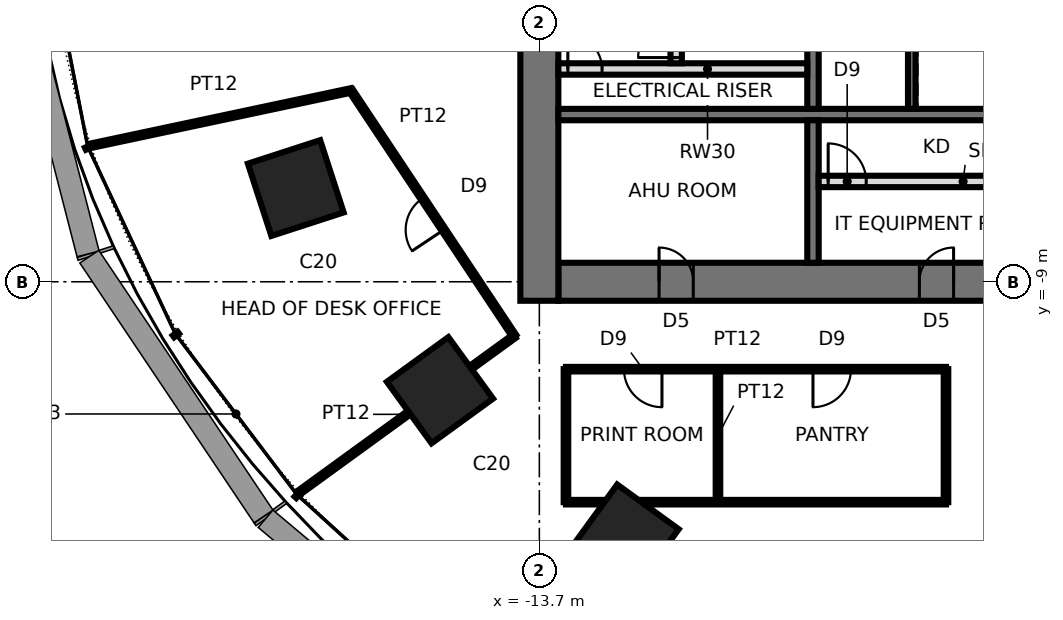
"""IFC4 building model, lengths in metres.
Left out: names, types, materials, properties, quantities, classifications, styles, units other than length and angle.
Written with IfcOpenShell. Run it as: python <this file> out.ifc"""

import sys

from ifc_helpers import new_model, si_unit, direction, frame, frame_2d, origin, origin_2d, place, context, subcontext, project, spatial, rectangle, extrude, element, fill, save


model = new_model("IFC4")
c1 = context("Model", 3, precision=1e-05, world=origin(), true_north=direction((0.0, 1.0)))
c2 = subcontext(c1, "Body", "Model", "MODEL_VIEW")
j1 = project(units=[si_unit("LENGTHUNIT", "METRE"), si_unit("PLANEANGLEUNIT", "RADIAN")], contexts=[c1])
p1 = place(None, origin())
s1 = spatial("IfcSite", under=j1, at=p1, CompositionType="ELEMENT")
p2 = place(p1, origin())
s2 = spatial("IfcBuilding", under=s1, at=p2, CompositionType="ELEMENT")
p3 = place(p2, frame((0.0, 0.0, 23.8)))
s3 = spatial("IfcBuildingStorey", under=s2, at=p3, CompositionType="ELEMENT", Elevation=23.8)
for number, where, z_axis, x_axis in (
    (1, (-20.109, -6.534, 0.0), (0.0, 0.0, 1.0), (-0.951, -0.309, 0.0)),
    (2, (-16.315, -11.854, 0.0), (0.0, 0.0, 1.0), (-0.809, -0.588, 0.0)),
    (3, (-11.43, -15.733, 0.0), (0.0, 0.0, 1.0), (-0.588, -0.809, 0.0)),
):
    element("IfcColumn", number, at=place(p3, frame(where, z_axis=z_axis, x_axis=x_axis)), inside=s3, PredefinedType="COLUMN", context=c2, shape_type="SweptSolid", body=[
        extrude(rectangle(XDim=2.0, YDim=2.0, at=origin_2d()), origin(), (0.0, 0.0, 1.0), 4.2),
    ])
p4 = place(p3, frame((-13.2, -9.0, 0.0), z_axis=(0.0, 0.0, 1.0), x_axis=(1.0, 0.0, 0.0)))
e4 = element("IfcWall", 4, at=p4, inside=s3, PredefinedType="SHEAR", context=c2, shape_type="SweptSolid", body=[
    extrude(rectangle(XDim=26.4, YDim=1.0, at=frame_2d((13.2, 0.0))), origin(), (0.0, 0.0, 1.0), 4.2),
])
p5 = place(p4, frame((2.65, 0.0, 0.0)))
e5 = element("IfcOpeningElement", 5, at=p5, cuts=e4, PredefinedType="OPENING", context=c2, shape_type="SweptSolid", body=[
    extrude(rectangle(XDim=0.9, YDim=2.1, at=frame_2d((0.45, 1.05))), frame((0.0, 0.51, 0.0), z_axis=(0.0, -1.0, 0.0), x_axis=(1.0, 0.0, 0.0)), (0.0, 0.0, 1.0), 1.02),
])
p6 = place(p4, frame((9.5, 0.0, 0.0)))
e6 = element("IfcOpeningElement", 6, at=p6, cuts=e4, PredefinedType="OPENING", context=c2, shape_type="SweptSolid", body=[
    extrude(rectangle(XDim=0.9, YDim=2.1, at=frame_2d((0.45, 1.05))), frame((0.0, 0.51, 0.0), z_axis=(0.0, -1.0, 0.0), x_axis=(1.0, 0.0, 0.0)), (0.0, 0.0, 1.0), 1.02),
])
p7 = place(p4, frame((16.0, 0.0, 0.0)))
e7 = element("IfcOpeningElement", 7, at=p7, cuts=e4, PredefinedType="OPENING", context=c2, shape_type="SweptSolid", body=[
    extrude(rectangle(XDim=0.9, YDim=2.1, at=frame_2d((0.45, 1.05))), frame((0.0, 0.51, 0.0), z_axis=(0.0, -1.0, 0.0), x_axis=(1.0, 0.0, 0.0)), (0.0, 0.0, 1.0), 1.02),
])
p8 = place(p4, frame((22.85, 0.0, 0.0)))
e8 = element("IfcOpeningElement", 8, at=p8, cuts=e4, PredefinedType="OPENING", context=c2, shape_type="SweptSolid", body=[
    extrude(rectangle(XDim=0.9, YDim=2.1, at=frame_2d((0.45, 1.05))), frame((0.0, 0.51, 0.0), z_axis=(0.0, -1.0, 0.0), x_axis=(1.0, 0.0, 0.0)), (0.0, 0.0, 1.0), 1.02),
])
p9 = place(p3, frame((-13.7, 9.5, 0.0), z_axis=(0.0, 0.0, 1.0), x_axis=(0.0, -1.0, 0.0)))
e9 = element("IfcWall", 9, at=p9, inside=s3, PredefinedType="SHEAR", context=c2, shape_type="SweptSolid", body=[
    extrude(rectangle(XDim=19.0, YDim=1.0, at=frame_2d((9.5, 0.0))), origin(), (0.0, 0.0, 1.0), 4.2),
])
p10 = place(p9, frame((8.6, 0.0, 0.0)))
e10 = element("IfcOpeningElement", 10, at=p10, cuts=e9, PredefinedType="OPENING", context=c2, shape_type="SweptSolid", body=[
    extrude(rectangle(XDim=1.8, YDim=2.4, at=frame_2d((0.9, 1.2))), frame((0.0, 0.51, 0.0), z_axis=(0.0, -1.0, 0.0), x_axis=(1.0, 0.0, 0.0)), (0.0, 0.0, 1.0), 1.02),
])
p11 = place(p3, frame((-13.2, -4.6, 0.0), z_axis=(0.0, 0.0, 1.0), x_axis=(1.0, 0.0, 0.0)))
e11 = element("IfcWall", 11, at=p11, inside=s3, PredefinedType="SHEAR", context=c2, shape_type="SweptSolid", body=[
    extrude(rectangle(XDim=26.4, YDim=0.3, at=frame_2d((13.2, 0.0))), origin(), (0.0, 0.0, 1.0), 4.2),
])
p12 = place(p3, frame((-6.5, -1.75, 0.0), z_axis=(0.0, 0.0, 1.0), x_axis=(0.0, -1.0, 0.0)))
e12 = element("IfcWall", 12, at=p12, inside=s3, PredefinedType="SHEAR", context=c2, shape_type="SweptSolid", body=[
    extrude(rectangle(XDim=2.7, YDim=0.3, at=frame_2d((1.35, 0.0))), origin(), (0.0, 0.0, 1.0), 4.2),
])
p13 = place(p3, frame((-6.5, -4.75, 0.0), z_axis=(0.0, 0.0, 1.0), x_axis=(0.0, -1.0, 0.0)))
e13 = element("IfcWall", 13, at=p13, inside=s3, PredefinedType="SHEAR", context=c2, shape_type="SweptSolid", body=[
    extrude(rectangle(XDim=3.75, YDim=0.3, at=frame_2d((1.875, 0.0))), origin(), (0.0, 0.0, 1.0), 4.2),
])
p14 = place(p3, frame((-3.9, -1.75, 0.0), z_axis=(0.0, 0.0, 1.0), x_axis=(0.0, -1.0, 0.0)))
e14 = element("IfcWall", 14, at=p14, inside=s3, PredefinedType="SHEAR", context=c2, shape_type="SweptSolid", body=[
    extrude(rectangle(XDim=2.7, YDim=0.2, at=frame_2d((1.35, 0.0))), origin(), (0.0, 0.0, 1.0), 4.2),
])
p15 = place(p3, frame((-6.35, -6.36, 0.0), z_axis=(0.0, 0.0, 1.0), x_axis=(1.0, 0.0, 0.0)))
e15 = element("IfcWall", 15, at=p15, inside=s3, PredefinedType="PARTITIONING", context=c2, shape_type="SweptSolid", body=[
    extrude(rectangle(XDim=6.2, YDim=0.3, at=frame_2d((3.1, 0.0))), origin(), (0.0, 0.0, 1.0), 4.04),
])
p16 = place(p15, frame((0.25, 0.0, 0.0)))
e16 = element("IfcOpeningElement", 16, at=p16, cuts=e15, PredefinedType="OPENING", context=c2, shape_type="SweptSolid", body=[
    extrude(rectangle(XDim=1.0, YDim=2.4, at=frame_2d((0.5, 1.2))), frame((0.0, 0.16, 0.0), z_axis=(0.0, -1.0, 0.0), x_axis=(1.0, 0.0, 0.0)), (0.0, 0.0, 1.0), 0.32),
])
p17 = place(p3, frame((-13.2, -3.4, 0.0), z_axis=(0.0, 0.0, 1.0), x_axis=(1.0, 0.0, 0.0)))
e17 = element("IfcWall", 17, at=p17, inside=s3, PredefinedType="SOLIDWALL", context=c2, shape_type="SweptSolid", body=[
    extrude(rectangle(XDim=6.55, YDim=0.3, at=frame_2d((3.275, 0.0))), origin(), (0.0, 0.0, 1.0), 4.04),
])
p18 = place(p17, frame((0.25, 0.0, 0.0)))
e18 = element("IfcOpeningElement", 18, at=p18, cuts=e17, PredefinedType="OPENING", context=c2, shape_type="SweptSolid", body=[
    extrude(rectangle(XDim=0.9, YDim=2.1, at=frame_2d((0.45, 1.05))), frame((0.0, 0.16, 0.0), z_axis=(0.0, -1.0, 0.0), x_axis=(1.0, 0.0, 0.0)), (0.0, 0.0, 1.0), 0.32),
])
p19 = place(p3, frame((-10.1, -3.25, 0.0), z_axis=(0.0, 0.0, 1.0), x_axis=(0.0, 1.0, 0.0)))
e19 = element("IfcWall", 19, at=p19, inside=s3, PredefinedType="PARTITIONING", context=c2, shape_type="SweptSolid", body=[
    extrude(rectangle(XDim=1.5, YDim=0.3, at=frame_2d((0.75, 0.0))), origin(), (0.0, 0.0, 1.0), 4.04),
])
p20 = place(p19, frame((0.15, 0.0, 0.0)))
e20 = element("IfcOpeningElement", 20, at=p20, cuts=e19, PredefinedType="OPENING", context=c2, shape_type="SweptSolid", body=[
    extrude(rectangle(XDim=1.0, YDim=2.4, at=frame_2d((0.5, 1.2))), frame((0.0, 0.16, 0.0), z_axis=(0.0, -1.0, 0.0), x_axis=(1.0, 0.0, 0.0)), (0.0, 0.0, 1.0), 0.32),
])
p21 = place(p3, frame((-18.659, -3.966, 0.0), z_axis=(0.0, 0.0, 1.0), x_axis=(-0.978148655968, -0.207906726269, 0.0)))
e21 = element("IfcWall", 21, at=p21, inside=s3, PredefinedType="PARTITIONING", context=c2, shape_type="SweptSolid", body=[
    extrude(rectangle(XDim=7.0, YDim=0.12, at=frame_2d((3.5, 0.0))), origin(), (0.0, 0.0, 1.0), 4.04),
])
p22 = place(p3, frame((-14.358, -10.431, 0.0), z_axis=(0.0, 0.0, 1.0), x_axis=(-0.553959944771, 0.832543319948, 0.0)))
e22 = element("IfcWall", 22, at=p22, inside=s3, PredefinedType="PARTITIONING", context=c2, shape_type="SweptSolid", body=[
    extrude(rectangle(XDim=7.765, YDim=0.12, at=frame_2d((3.883, 0.0))), origin(), (0.0, 0.0, 1.0), 4.04),
])
p23 = place(p22, frame((3.358, 0.0, 0.0)))
e23 = element("IfcOpeningElement", 23, at=p23, cuts=e22, PredefinedType="OPENING", context=c2, shape_type="SweptSolid", body=[
    extrude(rectangle(XDim=1.0, YDim=2.4, at=frame_2d((0.5, 1.2))), frame((0.0, 0.07, 0.0), z_axis=(0.0, -1.0, 0.0), x_axis=(1.0, 0.0, 0.0)), (0.0, 0.0, 1.0), 0.14),
])
p24 = place(p3, frame((-20.021, -14.546, 0.0), z_axis=(0.0, 0.0, 1.0), x_axis=(0.809015012105, 0.587787980643, 0.0)))
e24 = element("IfcWall", 24, at=p24, inside=s3, PredefinedType="PARTITIONING", context=c2, shape_type="SweptSolid", body=[
    extrude(rectangle(XDim=7.0, YDim=0.12, at=frame_2d((3.5, 0.0))), origin(), (0.0, 0.0, 1.0), 2.84),
])
p25 = place(p3, frame((-13.0, -14.8, 0.0), z_axis=(0.0, 0.0, 1.0), x_axis=(0.0, 1.0, 0.0)))
e25 = element("IfcWall", 25, at=p25, inside=s3, PredefinedType="PARTITIONING", context=c2, shape_type="SweptSolid", body=[
    extrude(rectangle(XDim=3.5, YDim=0.12, at=frame_2d((1.75, 0.0))), origin(), (0.0, 0.0, 1.0), 4.04),
])
p26 = place(p3, frame((-13.0, -11.3, 0.0), z_axis=(0.0, 0.0, 1.0), x_axis=(1.0, 0.0, 0.0)))
e26 = element("IfcWall", 26, at=p26, inside=s3, PredefinedType="PARTITIONING", context=c2, shape_type="SweptSolid", body=[
    extrude(rectangle(XDim=10.0, YDim=0.12, at=frame_2d((5.0, 0.0))), origin(), (0.0, 0.0, 1.0), 4.04),
])
p27 = place(p26, frame((1.526, 0.0, 0.0)))
e27 = element("IfcOpeningElement", 27, at=p27, cuts=e26, PredefinedType="OPENING", context=c2, shape_type="SweptSolid", body=[
    extrude(rectangle(XDim=1.0, YDim=2.4, at=frame_2d((0.5, 1.2))), frame((0.0, 0.07, 0.0), z_axis=(0.0, -1.0, 0.0), x_axis=(1.0, 0.0, 0.0)), (0.0, 0.0, 1.0), 0.14),
])
p28 = place(p26, frame((6.5, 0.0, 0.0)))
e28 = element("IfcOpeningElement", 28, at=p28, cuts=e26, PredefinedType="OPENING", context=c2, shape_type="SweptSolid", body=[
    extrude(rectangle(XDim=1.0, YDim=2.4, at=frame_2d((0.5, 1.2))), frame((0.0, 0.07, 0.0), z_axis=(0.0, -1.0, 0.0), x_axis=(1.0, 0.0, 0.0)), (0.0, 0.0, 1.0), 0.14),
])
p29 = place(p3, frame((-9.0, -11.3, 0.0), z_axis=(0.0, 0.0, 1.0), x_axis=(0.0, -1.0, 0.0)))
e29 = element("IfcWall", 29, at=p29, inside=s3, PredefinedType="PARTITIONING", context=c2, shape_type="SweptSolid", body=[
    extrude(rectangle(XDim=3.5, YDim=0.12, at=frame_2d((1.75, 0.0))), origin(), (0.0, 0.0, 1.0), 4.04),
])
p30 = place(p3, frame((-3.0, -14.8, 0.0), z_axis=(0.0, 0.0, 1.0), x_axis=(-1.0, 0.0, 0.0)))
e30 = element("IfcWall", 30, at=p30, inside=s3, PredefinedType="PARTITIONING", context=c2, shape_type="SweptSolid", body=[
    extrude(rectangle(XDim=10.0, YDim=0.12, at=frame_2d((5.0, 0.0))), origin(), (0.0, 0.0, 1.0), 4.04),
])
p31 = place(p3, frame((-3.0, -11.3, 0.0), z_axis=(0.0, 0.0, 1.0), x_axis=(0.0, -1.0, 0.0)))
e31 = element("IfcWall", 31, at=p31, inside=s3, PredefinedType="PARTITIONING", context=c2, shape_type="SweptSolid", body=[
    extrude(rectangle(XDim=3.5, YDim=0.12, at=frame_2d((1.75, 0.0))), origin(), (0.0, 0.0, 1.0), 4.04),
])
p32 = place(p5, origin())
e32 = element("IfcDoor", 32, at=p32, inside=s3, OperationType="SINGLE_SWING_LEFT", PredefinedType="DOOR", context=c2, shape_type="SweptSolid", body=[
    extrude(rectangle(XDim=0.82, YDim=2.06, at=frame_2d((0.45, 1.03))), frame((0.0, 0.025, 0.0), z_axis=(0.0, -1.0, 0.0), x_axis=(1.0, 0.0, 0.0)), (0.0, 0.0, 1.0), 0.05),
    extrude(rectangle(XDim=0.04, YDim=2.1, at=frame_2d((0.02, 1.05))), frame((0.0, 0.25, 0.0), z_axis=(0.0, -1.0, 0.0), x_axis=(1.0, 0.0, 0.0)), (0.0, 0.0, 1.0), 0.5),
    extrude(rectangle(XDim=0.04, YDim=2.1, at=frame_2d((0.88, 1.05))), frame((0.0, 0.25, 0.0), z_axis=(0.0, -1.0, 0.0), x_axis=(1.0, 0.0, 0.0)), (0.0, 0.0, 1.0), 0.5),
    extrude(rectangle(XDim=0.82, YDim=0.04, at=frame_2d((0.45, 2.08))), frame((0.0, 0.25, 0.0), z_axis=(0.0, -1.0, 0.0), x_axis=(1.0, 0.0, 0.0)), (0.0, 0.0, 1.0), 0.5),
])
fill(e5, e32)
p33 = place(p6, origin())
e33 = element("IfcDoor", 33, at=p33, inside=s3, OperationType="SINGLE_SWING_RIGHT", PredefinedType="DOOR", context=c2, shape_type="SweptSolid", body=[
    extrude(rectangle(XDim=0.82, YDim=2.06, at=frame_2d((0.45, 1.03))), frame((0.0, 0.025, 0.0), z_axis=(0.0, -1.0, 0.0), x_axis=(1.0, 0.0, 0.0)), (0.0, 0.0, 1.0), 0.05),
    extrude(rectangle(XDim=0.04, YDim=2.1, at=frame_2d((0.02, 1.05))), frame((0.0, 0.25, 0.0), z_axis=(0.0, -1.0, 0.0), x_axis=(1.0, 0.0, 0.0)), (0.0, 0.0, 1.0), 0.5),
    extrude(rectangle(XDim=0.04, YDim=2.1, at=frame_2d((0.88, 1.05))), frame((0.0, 0.25, 0.0), z_axis=(0.0, -1.0, 0.0), x_axis=(1.0, 0.0, 0.0)), (0.0, 0.0, 1.0), 0.5),
    extrude(rectangle(XDim=0.82, YDim=0.04, at=frame_2d((0.45, 2.08))), frame((0.0, 0.25, 0.0), z_axis=(0.0, -1.0, 0.0), x_axis=(1.0, 0.0, 0.0)), (0.0, 0.0, 1.0), 0.5),
])
fill(e6, e33)
p34 = place(p16, origin())
e34 = element("IfcDoor", 34, at=p34, inside=s3, OperationType="SINGLE_SWING_LEFT", PredefinedType="DOOR", context=c2, shape_type="SweptSolid", body=[
    extrude(rectangle(XDim=1.0, YDim=2.4, at=frame_2d((0.5, 1.2))), frame((0.0, 0.025, 0.0), z_axis=(0.0, -1.0, 0.0), x_axis=(1.0, 0.0, 0.0)), (0.0, 0.0, 1.0), 0.05),
])
fill(e16, e34)
p35 = place(p18, origin())
e35 = element("IfcDoor", 35, at=p35, inside=s3, OperationType="SINGLE_SWING_LEFT", PredefinedType="DOOR", context=c2, shape_type="SweptSolid", body=[
    extrude(rectangle(XDim=0.9, YDim=2.1, at=frame_2d((0.45, 1.05))), frame((0.0, 0.025, 0.0), z_axis=(0.0, -1.0, 0.0), x_axis=(1.0, 0.0, 0.0)), (0.0, 0.0, 1.0), 0.05),
])
fill(e18, e35)
p36 = place(p20, origin())
e36 = element("IfcDoor", 36, at=p36, inside=s3, OperationType="SINGLE_SWING_LEFT", PredefinedType="DOOR", context=c2, shape_type="SweptSolid", body=[
    extrude(rectangle(XDim=1.0, YDim=2.4, at=frame_2d((0.5, 1.2))), frame((0.0, 0.025, 0.0), z_axis=(0.0, -1.0, 0.0), x_axis=(1.0, 0.0, 0.0)), (0.0, 0.0, 1.0), 0.05),
])
fill(e20, e36)
p37 = place(p23, origin())
e37 = element("IfcDoor", 37, at=p37, inside=s3, OperationType="SINGLE_SWING_LEFT", PredefinedType="DOOR", context=c2, shape_type="SweptSolid", body=[
    extrude(rectangle(XDim=1.0, YDim=2.4, at=frame_2d((0.5, 1.2))), frame((0.0, 0.025, 0.0), z_axis=(0.0, -1.0, 0.0), x_axis=(1.0, 0.0, 0.0)), (0.0, 0.0, 1.0), 0.05),
])
fill(e23, e37)
p38 = place(p27, frame((1.0, 0.0, 0.0), z_axis=(0.0, 0.0, 1.0), x_axis=(-1.0, 0.0, 0.0)))
e38 = element("IfcDoor", 38, at=p38, inside=s3, OperationType="SINGLE_SWING_LEFT", PredefinedType="DOOR", context=c2, shape_type="SweptSolid", body=[
    extrude(rectangle(XDim=1.0, YDim=2.4, at=frame_2d((0.5, 1.2))), frame((0.0, 0.025, 0.0), z_axis=(0.0, -1.0, 0.0), x_axis=(1.0, 0.0, 0.0)), (0.0, 0.0, 1.0), 0.05),
])
fill(e27, e38)
p39 = place(p28, frame((1.0, 0.0, 0.0), z_axis=(0.0, 0.0, 1.0), x_axis=(-1.0, 0.0, 0.0)))
e39 = element("IfcDoor", 39, at=p39, inside=s3, OperationType="SINGLE_SWING_RIGHT", PredefinedType="DOOR", context=c2, shape_type="SweptSolid", body=[
    extrude(rectangle(XDim=1.0, YDim=2.4, at=frame_2d((0.5, 1.2))), frame((0.0, 0.025, 0.0), z_axis=(0.0, -1.0, 0.0), x_axis=(1.0, 0.0, 0.0)), (0.0, 0.0, 1.0), 0.05),
])
fill(e28, e39)
save(model, sys.argv[1])
